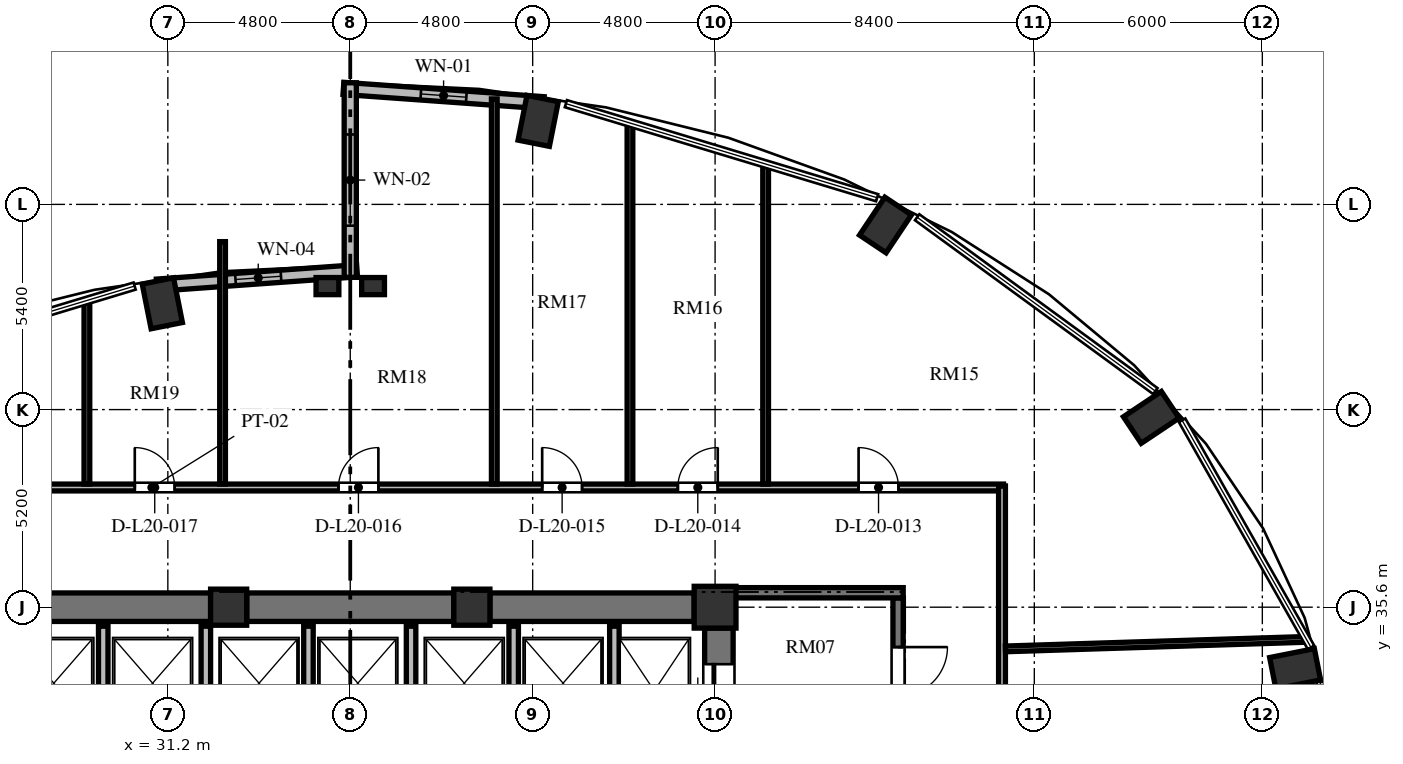
"""IFC4 building model, lengths in metres.
Left out: names, types, materials, properties, quantities, classifications, styles, units other than length and angle.
Written with IfcOpenShell. Run it as: python <this file> out.ifc"""

import sys

from ifc_helpers import new_model, si_unit, direction, frame, frame_2d, origin, origin_2d, place, context, subcontext, project, spatial, rectangle, extrude, element, fill, save


model = new_model("IFC4")
c1 = context("Model", 3, precision=1e-05, world=origin(), true_north=direction((0.0, 1.0)))
c2 = subcontext(c1, "Body", "Model", "MODEL_VIEW")
j1 = project(units=[si_unit("LENGTHUNIT", "METRE"), si_unit("PLANEANGLEUNIT", "RADIAN")], contexts=[c1])
p1 = place(None, origin())
s1 = spatial("IfcSite", under=j1, at=p1, CompositionType="ELEMENT")
p2 = place(p1, origin())
s2 = spatial("IfcBuilding", under=s1, at=p2, CompositionType="ELEMENT")
p3 = place(p2, frame((0.0, 0.0, 81.744)))
s3 = spatial("IfcBuildingStorey", under=s2, at=p3, CompositionType="ELEMENT", Elevation=81.744)
for number, where, z_axis, x_axis in (
    (1, (60.863, 33.98, 0.0), (0.0, 0.0, 1.0), (0.981, 0.195, 0.0)),
    (2, (57.078, 40.595, 0.0), (0.0, 0.0, 1.0), (0.831, 0.556, 0.0)),
    (3, (50.084, 45.657, 0.0), (0.0, 0.0, 1.0), (0.556, 0.831, 0.0)),
    (4, (40.946, 48.397, 0.0), (0.0, 0.0, 1.0), (0.195, 0.981, 0.0)),
    (5, (31.054, 43.597, 0.0), (0.0, 0.0, 1.0), (-0.195, 0.981, 0.0)),
):
    element("IfcColumn", number, at=place(p3, frame(where, z_axis=z_axis, x_axis=x_axis)), inside=s3, PredefinedType="COLUMN", context=c2, shape_type="SweptSolid", body=[
        extrude(rectangle(XDim=1.2, YDim=0.84, at=origin_2d()), origin(), (0.0, 0.0, 1.0), 3.648),
    ])
p4 = place(p3, frame((45.6, 35.6, 0.0), z_axis=(0.0, 0.0, 1.0), x_axis=(1.0, 0.0, 0.0)))
e6 = element("IfcColumn", 6, at=p4, inside=s3, PredefinedType="COLUMN", context=c2, shape_type="SweptSolid", body=[
    extrude(rectangle(XDim=1.1, YDim=1.1, at=origin_2d()), origin(), (0.0, 0.0, 1.0), 3.648),
])
for number, where, z_axis, x_axis in (
    (7, (39.2, 35.6, 0.0), (0.0, 0.0, 1.0), (1.0, 0.0, 0.0)),
    (8, (32.8, 35.6, 0.0), (0.0, 0.0, 1.0), (1.0, 0.0, 0.0)),
):
    element("IfcColumn", number, at=place(p3, frame(where, z_axis=z_axis, x_axis=x_axis)), inside=s3, PredefinedType="COLUMN", context=c2, shape_type="SweptSolid", body=[
        extrude(rectangle(XDim=0.95, YDim=0.95, at=origin_2d()), origin(), (0.0, 0.0, 1.0), 3.648),
    ])
for number, where, z_axis, x_axis in (
    (9, (35.4, 44.05, 0.0), (0.0, 0.0, 1.0), (1.0, 0.0, 0.0)),
    (10, (36.6, 44.05, 0.0), (0.0, 0.0, 1.0), (1.0, 0.0, 0.0)),
):
    element("IfcColumn", number, at=place(p3, frame(where, z_axis=z_axis, x_axis=x_axis)), inside=s3, PredefinedType="PILASTER", context=c2, shape_type="SweptSolid", body=[
        extrude(rectangle(XDim=0.6, YDim=0.45, at=origin_2d()), origin(), (0.0, 0.0, 1.0), 3.648),
    ])
p5 = place(p3, frame((45.7, 20.95, 0.0), z_axis=(0.0, 0.0, 1.0), x_axis=(0.0, 1.0, 0.0)))
e11 = element("IfcWall", 11, at=p5, inside=s3, PredefinedType="SHEAR", context=c2, shape_type="SweptSolid", body=[
    extrude(rectangle(XDim=14.1, YDim=0.75, at=frame_2d((7.05, 0.0))), origin(), (0.0, 0.0, 1.0), 3.648),
])
p6 = place(p5, frame((11.75, 0.0, 0.0)))
e12 = element("IfcOpeningElement", 12, at=p6, cuts=e11, PredefinedType="OPENING", context=c2, shape_type="SweptSolid", body=[
    extrude(rectangle(XDim=1.4, YDim=2.3, at=frame_2d((0.7, 1.15))), frame((0.0, 0.385, 0.0), z_axis=(0.0, -1.0, 0.0), x_axis=(1.0, 0.0, 0.0)), (0.0, 0.0, 1.0), 0.77),
])
p7 = place(p5, frame((0.95, 0.0, 0.0)))
e13 = element("IfcOpeningElement", 13, at=p7, cuts=e11, PredefinedType="OPENING", context=c2, shape_type="SweptSolid", body=[
    extrude(rectangle(XDim=1.4, YDim=2.3, at=frame_2d((0.7, 1.15))), frame((0.0, 0.385, 0.0), z_axis=(0.0, -1.0, 0.0), x_axis=(1.0, 0.0, 0.0)), (0.0, 0.0, 1.0), 0.77),
])
p8 = place(p3, frame((26.95, 35.6, 0.0), z_axis=(0.0, 0.0, 1.0), x_axis=(1.0, 0.0, 0.0)))
e14 = element("IfcWall", 14, at=p8, inside=s3, PredefinedType="SHEAR", context=c2, shape_type="SweptSolid", body=[
    extrude(rectangle(XDim=5.375, YDim=0.75, at=frame_2d((2.688, 0.0))), origin(), (0.0, 0.0, 1.0), 3.648),
])
p9 = place(p3, frame((33.275, 35.6, 0.0), z_axis=(0.0, 0.0, 1.0), x_axis=(1.0, 0.0, 0.0)))
e15 = element("IfcWall", 15, at=p9, inside=s3, PredefinedType="SHEAR", context=c2, shape_type="SweptSolid", body=[
    extrude(rectangle(XDim=5.45, YDim=0.75, at=frame_2d((2.725, 0.0))), origin(), (0.0, 0.0, 1.0), 3.648),
])
p10 = place(p3, frame((39.675, 35.6, 0.0), z_axis=(0.0, 0.0, 1.0), x_axis=(1.0, 0.0, 0.0)))
e16 = element("IfcWall", 16, at=p10, inside=s3, PredefinedType="SHEAR", context=c2, shape_type="SweptSolid", body=[
    extrude(rectangle(XDim=5.375, YDim=0.75, at=frame_2d((2.688, 0.0))), origin(), (0.0, 0.0, 1.0), 3.648),
])
p11 = place(p3, frame((41.091, 48.875, 0.0), z_axis=(0.0, 0.0, 1.0), x_axis=(-0.997432364291, 0.071614793619, 0.0)))
e17 = element("IfcWall", 17, at=p11, inside=s3, PredefinedType="SOLIDWALL", context=c2, shape_type="SweptSolid", body=[
    extrude(rectangle(XDim=5.284, YDim=0.32, at=frame_2d((2.642, 0.0))), origin(), (0.0, 0.0, 1.0), 3.428),
])
p12 = place(p11, frame((2.042, 0.0, 0.85)))
e18 = element("IfcOpeningElement", 18, at=p12, cuts=e17, PredefinedType="OPENING", context=c2, shape_type="SweptSolid", body=[
    extrude(rectangle(XDim=1.2, YDim=2.2, at=frame_2d((0.6, 1.1))), frame((0.0, 0.17, 0.0), z_axis=(0.0, -1.0, 0.0), x_axis=(1.0, 0.0, 0.0)), (0.0, 0.0, 1.0), 0.34),
])
p13 = place(p3, frame((36.179, 44.453, 0.0), z_axis=(0.0, 0.0, 1.0), x_axis=(-0.997431890304, -0.071621394884, 0.0)))
e19 = element("IfcWall", 19, at=p13, inside=s3, PredefinedType="SOLIDWALL", context=c2, shape_type="SweptSolid", body=[
    extrude(rectangle(XDim=5.284, YDim=0.32, at=frame_2d((2.642, 0.0))), origin(), (0.0, 0.0, 1.0), 3.428),
])
p14 = place(p13, frame((2.007, 0.0, 0.85)))
e20 = element("IfcOpeningElement", 20, at=p14, cuts=e19, PredefinedType="OPENING", context=c2, shape_type="SweptSolid", body=[
    extrude(rectangle(XDim=1.2, YDim=1.8, at=frame_2d((0.6, 0.9))), frame((0.0, 0.17, 0.0), z_axis=(0.0, -1.0, 0.0), x_axis=(1.0, 0.0, 0.0)), (0.0, 0.0, 1.0), 0.34),
])
p15 = place(p3, frame((36.0, 49.4, 0.0), z_axis=(0.0, 0.0, 1.0), x_axis=(0.0, -1.0, 0.0)))
e21 = element("IfcWall", 21, at=p15, inside=s3, PredefinedType="SOLIDWALL", context=c2, shape_type="SweptSolid", body=[
    extrude(rectangle(XDim=5.12, YDim=0.32, at=frame_2d((2.56, 0.0))), origin(), (0.0, 0.0, 1.0), 3.428),
])
p16 = place(p15, frame((1.36, 0.0, 0.84)))
e22 = element("IfcOpeningElement", 22, at=p16, cuts=e21, PredefinedType="OPENING", context=c2, shape_type="SweptSolid", body=[
    extrude(rectangle(XDim=2.4, YDim=2.04, at=frame_2d((1.2, 1.02))), frame((0.0, 0.17, 0.0), z_axis=(0.0, -1.0, 0.0), x_axis=(1.0, 0.0, 0.0)), (0.0, 0.0, 1.0), 0.34),
])
p17 = place(p3, frame((42.95, 31.92, 0.0), z_axis=(0.0, 0.0, 1.0), x_axis=(0.0, 1.0, 0.0)))
e23 = element("IfcWall", 23, at=p17, inside=s3, PredefinedType="SOLIDWALL", context=c2, shape_type="SweptSolid", body=[
    extrude(rectangle(XDim=3.18, YDim=0.25, at=frame_2d((1.59, 0.0))), origin(), (0.0, 0.0, 1.0), 3.428),
])
for number, where, z_axis, x_axis in (
    (24, (29.5, 32.42, 0.0), (0.0, 0.0, 1.0), (0.0, 1.0, 0.0)),
    (25, (32.2, 32.42, 0.0), (0.0, 0.0, 1.0), (0.0, 1.0, 0.0)),
    (26, (34.9, 32.42, 0.0), (0.0, 0.0, 1.0), (0.0, 1.0, 0.0)),
    (27, (37.6, 32.42, 0.0), (0.0, 0.0, 1.0), (0.0, 1.0, 0.0)),
    (28, (40.3, 32.42, 0.0), (0.0, 0.0, 1.0), (0.0, 1.0, 0.0)),
):
    element("IfcWall", number, at=place(p3, frame(where, z_axis=z_axis, x_axis=x_axis)), inside=s3, PredefinedType="SOLIDWALL", context=c2, shape_type="SweptSolid", body=[
        extrude(rectangle(XDim=2.68, YDim=0.25, at=frame_2d((1.34, 0.0))), origin(), (0.0, 0.0, 1.0), 3.428),
    ])
p18 = place(p3, frame((50.415, 35.845, 0.0), z_axis=(0.0, 0.0, 1.0), x_axis=(0.0, -1.0, 0.0)))
e29 = element("IfcWall", 29, at=p18, inside=s3, PredefinedType="SHEAR", context=c2, shape_type="SweptSolid", body=[
    extrude(rectangle(XDim=15.825, YDim=0.27, at=frame_2d((7.913, 0.0))), origin(), (0.0, 0.0, 1.0), 3.648),
])
p19 = place(p18, frame((4.445, 0.0, 0.0)))
e30 = element("IfcOpeningElement", 30, at=p19, cuts=e29, PredefinedType="OPENING", context=c2, shape_type="SweptSolid", body=[
    extrude(rectangle(XDim=1.2, YDim=2.15, at=frame_2d((0.6, 1.075))), frame((0.0, 0.145, 0.0), z_axis=(0.0, -1.0, 0.0), x_axis=(1.0, 0.0, 0.0)), (0.0, 0.0, 1.0), 0.29),
])
p20 = place(p18, frame((1.295, 0.0, 0.0)))
e31 = element("IfcOpeningElement", 31, at=p20, cuts=e29, PredefinedType="OPENING", context=c2, shape_type="SweptSolid", body=[
    extrude(rectangle(XDim=1.3, YDim=2.2, at=frame_2d((0.65, 1.1))), frame((0.0, 0.145, 0.0), z_axis=(0.0, -1.0, 0.0), x_axis=(1.0, 0.0, 0.0)), (0.0, 0.0, 1.0), 0.29),
])
p21 = place(p18, frame((13.095, 0.0, 0.0)))
e32 = element("IfcOpeningElement", 32, at=p21, cuts=e29, PredefinedType="OPENING", context=c2, shape_type="SweptSolid", body=[
    extrude(rectangle(XDim=1.3, YDim=2.2, at=frame_2d((0.65, 1.1))), frame((0.0, 0.145, 0.0), z_axis=(0.0, -1.0, 0.0), x_axis=(1.0, 0.0, 0.0)), (0.0, 0.0, 1.0), 0.29),
])
p22 = place(p3, frame((46.075, 35.98, 0.0), z_axis=(0.0, 0.0, 1.0), x_axis=(1.0, 0.0, 0.0)))
e33 = element("IfcWall", 33, at=p22, inside=s3, PredefinedType="SHEAR", context=c2, shape_type="SweptSolid", body=[
    extrude(rectangle(XDim=4.475, YDim=0.27, at=frame_2d((2.238, 0.0))), origin(), (0.0, 0.0, 1.0), 3.648),
])
p23 = place(p3, frame((23.31, 38.75, 0.0), z_axis=(0.0, 0.0, 1.0), x_axis=(1.0, 0.0, 0.0)))
e34 = element("IfcWall", 34, at=p23, inside=s3, PredefinedType="PARTITIONING", context=c2, shape_type="SweptSolid", body=[
    extrude(rectangle(XDim=29.88, YDim=0.18, at=frame_2d((14.94, 0.0))), origin(), (0.0, 0.0, 1.0), 3.053),
])
p24 = place(p23, frame((26.066, 0.0, 0.0)))
e35 = element("IfcOpeningElement", 35, at=p24, cuts=e34, PredefinedType="OPENING", context=c2, shape_type="SweptSolid", body=[
    extrude(rectangle(XDim=1.05, YDim=2.15, at=frame_2d((0.525, 1.075))), frame((0.0, 0.1, 0.0), z_axis=(0.0, -1.0, 0.0), x_axis=(1.0, 0.0, 0.0)), (0.0, 0.0, 1.0), 0.2),
])
p25 = place(p23, frame((21.31, 0.0, 0.0)))
e36 = element("IfcOpeningElement", 36, at=p25, cuts=e34, PredefinedType="OPENING", context=c2, shape_type="SweptSolid", body=[
    extrude(rectangle(XDim=1.05, YDim=2.15, at=frame_2d((0.525, 1.075))), frame((0.0, 0.1, 0.0), z_axis=(0.0, -1.0, 0.0), x_axis=(1.0, 0.0, 0.0)), (0.0, 0.0, 1.0), 0.2),
])
p26 = place(p23, frame((17.74, 0.0, 0.0)))
e37 = element("IfcOpeningElement", 37, at=p26, cuts=e34, PredefinedType="OPENING", context=c2, shape_type="SweptSolid", body=[
    extrude(rectangle(XDim=1.05, YDim=2.15, at=frame_2d((0.525, 1.075))), frame((0.0, 0.1, 0.0), z_axis=(0.0, -1.0, 0.0), x_axis=(1.0, 0.0, 0.0)), (0.0, 0.0, 1.0), 0.2),
])
p27 = place(p23, frame((12.38, 0.0, 0.0)))
e38 = element("IfcOpeningElement", 38, at=p27, cuts=e34, PredefinedType="OPENING", context=c2, shape_type="SweptSolid", body=[
    extrude(rectangle(XDim=1.05, YDim=2.15, at=frame_2d((0.525, 1.075))), frame((0.0, 0.1, 0.0), z_axis=(0.0, -1.0, 0.0), x_axis=(1.0, 0.0, 0.0)), (0.0, 0.0, 1.0), 0.2),
])
p28 = place(p23, frame((7.02, 0.0, 0.0)))
e39 = element("IfcOpeningElement", 39, at=p28, cuts=e34, PredefinedType="OPENING", context=c2, shape_type="SweptSolid", body=[
    extrude(rectangle(XDim=1.05, YDim=2.15, at=frame_2d((0.525, 1.075))), frame((0.0, 0.1, 0.0), z_axis=(0.0, -1.0, 0.0), x_axis=(1.0, 0.0, 0.0)), (0.0, 0.0, 1.0), 0.2),
])
p29 = place(p23, frame((2.514, 0.0, 0.0)))
e40 = element("IfcOpeningElement", 40, at=p29, cuts=e34, PredefinedType="OPENING", context=c2, shape_type="SweptSolid", body=[
    extrude(rectangle(XDim=1.05, YDim=2.15, at=frame_2d((0.525, 1.075))), frame((0.0, 0.1, 0.0), z_axis=(0.0, -1.0, 0.0), x_axis=(1.0, 0.0, 0.0)), (0.0, 0.0, 1.0), 0.2),
])
p30 = place(p3, frame((53.15, 38.79, 0.0), z_axis=(0.0, 0.0, 1.0), x_axis=(0.0, -1.0, 0.0)))
e41 = element("IfcWall", 41, at=p30, inside=s3, PredefinedType="PARTITIONING", context=c2, shape_type="SweptSolid", body=[
    extrude(rectangle(XDim=9.43, YDim=0.18, at=frame_2d((4.715, 0.0))), origin(), (0.0, 0.0, 1.0), 3.428),
])
p31 = place(p3, frame((53.24, 34.502, 0.0), z_axis=(0.0, 0.0, 1.0), x_axis=(0.999499445349, 0.031636351679, 0.0)))
e42 = element("IfcWall", 42, at=p31, inside=s3, PredefinedType="PARTITIONING", context=c2, shape_type="SweptSolid", body=[
    extrude(rectangle(XDim=7.933, YDim=0.15, at=frame_2d((3.967, 0.0))), origin(), (0.0, 0.0, 1.0), 2.813),
])
p32 = place(p3, frame((29.07, 38.84, 0.0), z_axis=(0.0, 0.0, 1.0), x_axis=(0.0, 1.0, 0.0)))
e43 = element("IfcWall", 43, at=p32, inside=s3, PredefinedType="PARTITIONING", context=c2, shape_type="SweptSolid", body=[
    extrude(rectangle(XDim=4.817, YDim=0.15, at=frame_2d((2.409, 0.0))), origin(), (0.0, 0.0, 1.0), 3.428),
])
p33 = place(p3, frame((32.64, 38.84, 0.0), z_axis=(0.0, 0.0, 1.0), x_axis=(0.0, 1.0, 0.0)))
e44 = element("IfcWall", 44, at=p33, inside=s3, PredefinedType="PARTITIONING", context=c2, shape_type="SweptSolid", body=[
    extrude(rectangle(XDim=6.38, YDim=0.15, at=frame_2d((3.19, 0.0))), origin(), (0.0, 0.0, 1.0), 3.428),
])
p34 = place(p3, frame((39.79, 38.84, 0.0), z_axis=(0.0, 0.0, 1.0), x_axis=(0.0, 1.0, 0.0)))
e45 = element("IfcWall", 45, at=p34, inside=s3, PredefinedType="PARTITIONING", context=c2, shape_type="SweptSolid", body=[
    extrude(rectangle(XDim=10.135, YDim=0.15, at=frame_2d((5.068, 0.0))), origin(), (0.0, 0.0, 1.0), 2.813),
])
p35 = place(p3, frame((43.36, 38.84, 0.0), z_axis=(0.0, 0.0, 1.0), x_axis=(0.0, 1.0, 0.0)))
e46 = element("IfcWall", 46, at=p35, inside=s3, PredefinedType="PARTITIONING", context=c2, shape_type="SweptSolid", body=[
    extrude(rectangle(XDim=9.487, YDim=0.15, at=frame_2d((4.744, 0.0))), origin(), (0.0, 0.0, 1.0), 3.428),
])
p36 = place(p3, frame((46.93, 38.84, 0.0), z_axis=(0.0, 0.0, 1.0), x_axis=(0.0, 1.0, 0.0)))
e47 = element("IfcWall", 47, at=p36, inside=s3, PredefinedType="PARTITIONING", context=c2, shape_type="SweptSolid", body=[
    extrude(rectangle(XDim=8.408, YDim=0.15, at=frame_2d((4.204, 0.0))), origin(), (0.0, 0.0, 1.0), 3.428),
])
p37 = place(p12, origin())
e48 = element("IfcWindow", 48, at=p37, inside=s3, PartitioningType="SINGLE_PANEL", PredefinedType="WINDOW", context=c2, shape_type="SweptSolid", body=[
    extrude(rectangle(XDim=1.2, YDim=2.2, at=frame_2d((0.6, 1.1))), frame((0.0, 0.03, 0.0), z_axis=(0.0, -1.0, 0.0), x_axis=(1.0, 0.0, 0.0)), (0.0, 0.0, 1.0), 0.06),
])
fill(e18, e48)
p38 = place(p14, origin())
e49 = element("IfcWindow", 49, at=p38, inside=s3, PartitioningType="SINGLE_PANEL", PredefinedType="WINDOW", context=c2, shape_type="SweptSolid", body=[
    extrude(rectangle(XDim=1.2, YDim=1.8, at=frame_2d((0.6, 0.9))), frame((0.0, 0.03, 0.0), z_axis=(0.0, -1.0, 0.0), x_axis=(1.0, 0.0, 0.0)), (0.0, 0.0, 1.0), 0.06),
])
fill(e20, e49)
p39 = place(p16, origin())
e50 = element("IfcWindow", 50, at=p39, inside=s3, PartitioningType="SINGLE_PANEL", PredefinedType="WINDOW", context=c2, shape_type="SweptSolid", body=[
    extrude(rectangle(XDim=2.4, YDim=2.04, at=frame_2d((1.2, 1.02))), frame((0.0, 0.03, 0.0), z_axis=(0.0, -1.0, 0.0), x_axis=(1.0, 0.0, 0.0)), (0.0, 0.0, 1.0), 0.06),
])
fill(e22, e50)
p40 = place(p6, origin())
e51 = element("IfcDoor", 51, at=p40, inside=s3, OperationType="SLIDING_TO_LEFT", PredefinedType="DOOR", context=c2, shape_type="SweptSolid", body=[
    extrude(rectangle(XDim=1.4, YDim=2.3, at=frame_2d((0.7, 1.15))), frame((0.0, 0.025, 0.0), z_axis=(0.0, -1.0, 0.0), x_axis=(1.0, 0.0, 0.0)), (0.0, 0.0, 1.0), 0.05),
])
fill(e12, e51)
p41 = place(p20, origin())
e52 = element("IfcDoor", 52, at=p41, inside=s3, OperationType="SINGLE_SWING_LEFT", PredefinedType="DOOR", context=c2, shape_type="SweptSolid", body=[
    extrude(rectangle(XDim=1.3, YDim=2.2, at=frame_2d((0.65, 1.1))), frame((0.0, 0.025, 0.0), z_axis=(0.0, -1.0, 0.0), x_axis=(1.0, 0.0, 0.0)), (0.0, 0.0, 1.0), 0.05),
])
fill(e31, e52)
p42 = place(p24, origin())
e53 = element("IfcDoor", 53, at=p42, inside=s3, OperationType="SINGLE_SWING_LEFT", PredefinedType="DOOR", context=c2, shape_type="SweptSolid", body=[
    extrude(rectangle(XDim=1.05, YDim=2.15, at=frame_2d((0.525, 1.075))), frame((0.0, 0.025, 0.0), z_axis=(0.0, -1.0, 0.0), x_axis=(1.0, 0.0, 0.0)), (0.0, 0.0, 1.0), 0.05),
])
fill(e35, e53)
p43 = place(p25, origin())
e54 = element("IfcDoor", 54, at=p43, inside=s3, OperationType="SINGLE_SWING_RIGHT", PredefinedType="DOOR", context=c2, shape_type="SweptSolid", body=[
    extrude(rectangle(XDim=1.05, YDim=2.15, at=frame_2d((0.525, 1.075))), frame((0.0, 0.025, 0.0), z_axis=(0.0, -1.0, 0.0), x_axis=(1.0, 0.0, 0.0)), (0.0, 0.0, 1.0), 0.05),
])
fill(e36, e54)
p44 = place(p26, origin())
e55 = element("IfcDoor", 55, at=p44, inside=s3, OperationType="SINGLE_SWING_LEFT", PredefinedType="DOOR", context=c2, shape_type="SweptSolid", body=[
    extrude(rectangle(XDim=1.05, YDim=2.15, at=frame_2d((0.525, 1.075))), frame((0.0, 0.025, 0.0), z_axis=(0.0, -1.0, 0.0), x_axis=(1.0, 0.0, 0.0)), (0.0, 0.0, 1.0), 0.05),
])
fill(e37, e55)
p45 = place(p27, origin())
e56 = element("IfcDoor", 56, at=p45, inside=s3, OperationType="SINGLE_SWING_RIGHT", PredefinedType="DOOR", context=c2, shape_type="SweptSolid", body=[
    extrude(rectangle(XDim=1.05, YDim=2.15, at=frame_2d((0.525, 1.075))), frame((0.0, 0.025, 0.0), z_axis=(0.0, -1.0, 0.0), x_axis=(1.0, 0.0, 0.0)), (0.0, 0.0, 1.0), 0.05),
])
fill(e38, e56)
p46 = place(p28, origin())
e57 = element("IfcDoor", 57, at=p46, inside=s3, OperationType="SINGLE_SWING_LEFT", PredefinedType="DOOR", context=c2, shape_type="SweptSolid", body=[
    extrude(rectangle(XDim=1.05, YDim=2.15, at=frame_2d((0.525, 1.075))), frame((0.0, 0.025, 0.0), z_axis=(0.0, -1.0, 0.0), x_axis=(1.0, 0.0, 0.0)), (0.0, 0.0, 1.0), 0.05),
])
fill(e39, e57)
save(model, sys.argv[1])
